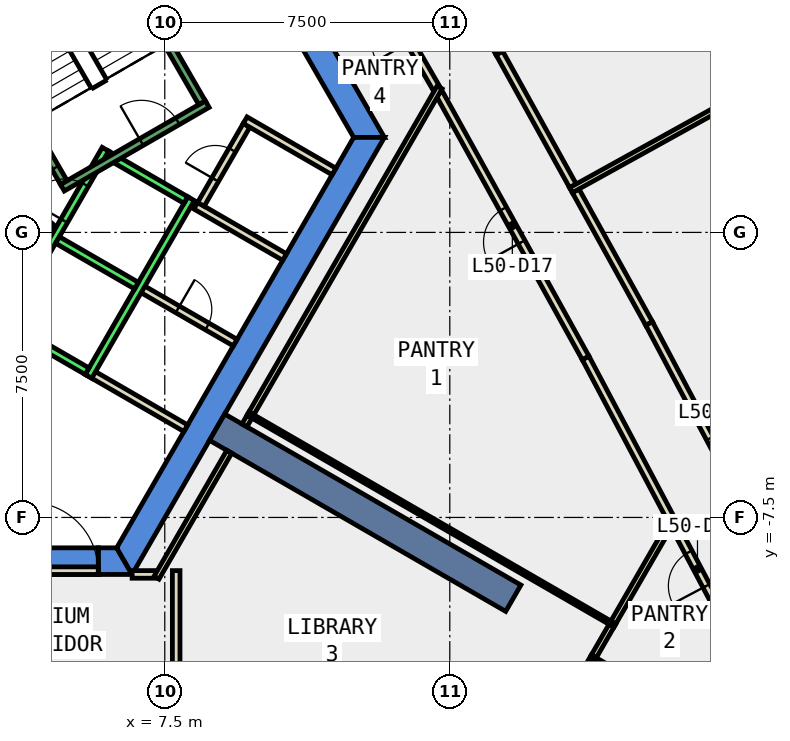
"""IFC4 building model, lengths in metres.
Left out: names, types, materials, properties, quantities, classifications, styles, units other than length and angle.
Written with IfcOpenShell. Run it as: python <this file> out.ifc"""

import sys

from ifc_helpers import new_model, si_unit, direction, frame, frame_2d, origin, place, context, subcontext, project, spatial, polyline, rectangle, outline, extrude, element, fill, save


model = new_model("IFC4")
c1 = context("Model", 3, precision=1e-05, world=origin(), true_north=direction((0.0, 1.0)))
c2 = subcontext(c1, "Body", "Model", "MODEL_VIEW")
j1 = project(units=[si_unit("LENGTHUNIT", "METRE"), si_unit("PLANEANGLEUNIT", "RADIAN")], contexts=[c1])
p1 = place(None, origin())
s1 = spatial("IfcSite", under=j1, at=p1, CompositionType="ELEMENT")
p2 = place(p1, origin())
s2 = spatial("IfcBuilding", under=s1, at=p2, CompositionType="ELEMENT")
p3 = place(p2, frame((0.0, 0.0, 223.4)))
s3 = spatial("IfcBuildingStorey", under=s2, at=p3, CompositionType="ELEMENT", Elevation=223.4)
p4 = place(p3, frame((0.0, 0.0, -0.4)))
e1 = element("IfcWall", 1, at=p4, inside=s3, PredefinedType="SHEAR", context=c2, shape_type="SweptSolid", body=[
    extrude(outline(polyline([(8.084, 11.498), (7.478, 11.148), (12.471, 2.5), (13.279, 2.5), (8.084, 11.498)])), origin(), (0.0, 0.0, 1.0), 4.2),
])
p5 = place(p3, frame((0.0, 0.0, -0.4)))
e2 = element("IfcWall", 2, at=p5, inside=s3, PredefinedType="SHEAR", context=c2, shape_type="SweptSolid", body=[
    extrude(outline(polyline([(5.75, -8.3), (5.75, -9.0), (6.64, -9.0), (6.235, -8.3), (5.75, -8.3)])), origin(), (0.0, 0.0, 1.0), 4.2),
])
p6 = place(p3, frame((0.0, 0.0, 3.6)))
e3 = element("IfcWall", 3, at=p6, inside=s3, PredefinedType="SHEAR", context=c2, shape_type="SweptSolid", body=[
    extrude(outline(polyline([(5.75, -9.0), (5.75, -8.3), (3.75, -8.3), (3.75, -9.0), (5.75, -9.0)])), origin(), (0.0, 0.0, 1.0), 0.2),
])
p7 = place(p3, frame((0.0, 0.0, -0.4)))
e4 = element("IfcWall", 4, at=p7, inside=s3, PredefinedType="SHEAR", context=c2, shape_type="SweptSolid", body=[
    extrude(outline(polyline([(6.64, -9.0), (13.279, 2.5), (12.471, 2.5), (6.235, -8.3), (6.64, -9.0)])), origin(), (0.0, 0.0, 1.0), 4.2),
])
p8 = place(p3, frame((8.877, -5.125, -0.4), z_axis=(0.0, 0.0, 1.0), x_axis=(0.866017533419, -0.500013631625, 0.0)))
e5 = element("IfcWall", 5, at=p8, inside=s3, PredefinedType="SHEAR", context=c2, shape_type="SweptSolid", body=[
    extrude(rectangle(XDim=9.0, YDim=0.8, at=frame_2d((4.5, 0.0))), origin(), (0.0, 0.0, 1.0), 4.2),
])
p9 = place(p3, frame((25.411, 0.968, 0.0), z_axis=(0.0, 0.0, 1.0), x_axis=(-0.484163461668, 0.87497756679, 0.0)))
e6 = element("IfcWall", 6, at=p9, inside=s3, PredefinedType="STANDARD", context=c2, shape_type="SweptSolid", body=[
    extrude(rectangle(XDim=7.247, YDim=0.3, at=frame_2d((3.624, 0.0))), origin(), (0.0, 0.0, 1.0), 3.8),
])
p10 = place(p9, frame((0.612, 0.0, 0.9)))
e7 = element("IfcOpeningElement", 7, at=p10, cuts=e6, PredefinedType="OPENING", context=c2, shape_type="SweptSolid", body=[
    extrude(rectangle(XDim=2.4, YDim=2.6, at=frame_2d((1.2, 1.3))), frame((0.0, 0.16, 0.0), z_axis=(0.0, -1.0, 0.0), x_axis=(1.0, 0.0, 0.0)), (0.0, 0.0, 1.0), 0.32),
])
p11 = place(p9, frame((4.235, 0.0, 0.9)))
e8 = element("IfcOpeningElement", 8, at=p11, cuts=e6, PredefinedType="OPENING", context=c2, shape_type="SweptSolid", body=[
    extrude(rectangle(XDim=2.4, YDim=2.6, at=frame_2d((1.2, 1.3))), frame((0.0, 0.16, 0.0), z_axis=(0.0, -1.0, 0.0), x_axis=(1.0, 0.0, 0.0)), (0.0, 0.0, 1.0), 0.32),
])
p12 = place(p3, frame((14.652, 3.783, 0.0), z_axis=(0.0, 0.0, 1.0), x_axis=(-0.499821427992, 0.866128477837, 0.0)))
e9 = element("IfcWall", 9, at=p12, inside=s3, PredefinedType="PARTITIONING", context=c2, shape_type="SweptSolid", body=[
    extrude(rectangle(XDim=3.844, YDim=0.2, at=frame_2d((1.922, 0.0))), origin(), (0.0, 0.0, 1.0), 3.8),
])
p13 = place(p12, frame((1.421, 0.0, 0.0)))
e10 = element("IfcOpeningElement", 10, at=p13, cuts=e9, PredefinedType="OPENING", context=c2, shape_type="SweptSolid", body=[
    extrude(rectangle(XDim=1.0, YDim=2.1, at=frame_2d((0.5, 1.05))), frame((0.0, 0.11, 0.0), z_axis=(0.0, -1.0, 0.0), x_axis=(1.0, 0.0, 0.0)), (0.0, 0.0, 1.0), 0.22),
])
p14 = place(p3, frame((20.882, -7.659, 0.0), z_axis=(0.0, 0.0, 1.0), x_axis=(-0.468206254133, 0.883619207346, 0.0)))
e11 = element("IfcWall", 11, at=p14, inside=s3, PredefinedType="PARTITIONING", context=c2, shape_type="SweptSolid", body=[
    extrude(rectangle(XDim=4.93, YDim=0.2, at=frame_2d((2.465, 0.0))), origin(), (0.0, 0.0, 1.0), 3.8),
])
p15 = place(p3, frame((18.574, -3.303, 0.0), z_axis=(0.0, 0.0, 1.0), x_axis=(-0.484239190765, 0.874935658279, 0.0)))
e12 = element("IfcWall", 12, at=p15, inside=s3, PredefinedType="PARTITIONING", context=c2, shape_type="SweptSolid", body=[
    extrude(rectangle(XDim=7.963, YDim=0.2, at=frame_2d((3.981, 0.0))), origin(), (0.0, 0.0, 1.0), 3.8),
])
p16 = place(p15, frame((3.482, 0.0, 0.0)))
e13 = element("IfcOpeningElement", 13, at=p16, cuts=e12, PredefinedType="OPENING", context=c2, shape_type="SweptSolid", body=[
    extrude(rectangle(XDim=1.0, YDim=2.1, at=frame_2d((0.5, 1.05))), frame((0.0, 0.11, 0.0), z_axis=(0.0, -1.0, 0.0), x_axis=(1.0, 0.0, 0.0)), (0.0, 0.0, 1.0), 0.22),
])
p17 = place(p3, frame((22.154, -10.06, 0.0), z_axis=(0.0, 0.0, 1.0), x_axis=(-0.468114756541, 0.883667683413, 0.0)))
e14 = element("IfcWall", 14, at=p17, inside=s3, PredefinedType="PARTITIONING", context=c2, shape_type="SweptSolid", body=[
    extrude(rectangle(XDim=2.717, YDim=0.2, at=frame_2d((1.359, 0.0))), origin(), (0.0, 0.0, 1.0), 3.8),
])
p18 = place(p17, frame((0.859, 0.0, 0.0)))
e15 = element("IfcOpeningElement", 15, at=p18, cuts=e14, PredefinedType="OPENING", context=c2, shape_type="SweptSolid", body=[
    extrude(rectangle(XDim=1.0, YDim=2.1, at=frame_2d((0.5, 1.05))), frame((0.0, 0.11, 0.0), z_axis=(0.0, -1.0, 0.0), x_axis=(1.0, 0.0, 0.0)), (0.0, 0.0, 1.0), 0.22),
])
p19 = place(p3, frame((18.312, 1.094, 0.0), z_axis=(0.0, 0.0, 1.0), x_axis=(0.484328424129, -0.874886265511, 0.0)))
e16 = element("IfcWall", 16, at=p19, inside=s3, PredefinedType="PARTITIONING", context=c2, shape_type="SweptSolid", body=[
    extrude(rectangle(XDim=3.991, YDim=0.2, at=frame_2d((1.996, 0.0))), origin(), (0.0, 0.0, 1.0), 3.8),
])
p20 = place(p3, frame((20.245, -2.398, 0.0), z_axis=(0.0, 0.0, 1.0), x_axis=(0.468063775621, -0.883694688199, 0.0)))
e17 = element("IfcWall", 17, at=p20, inside=s3, PredefinedType="PARTITIONING", context=c2, shape_type="SweptSolid", body=[
    extrude(rectangle(XDim=7.836, YDim=0.2, at=frame_2d((3.918, 0.0))), origin(), (0.0, 0.0, 1.0), 3.8),
])
p21 = place(p20, frame((3.418, 0.0, 0.0)))
e18 = element("IfcOpeningElement", 18, at=p21, cuts=e17, PredefinedType="OPENING", context=c2, shape_type="SweptSolid", body=[
    extrude(rectangle(XDim=1.0, YDim=2.1, at=frame_2d((0.5, 1.05))), frame((0.0, 0.11, 0.0), z_axis=(0.0, -1.0, 0.0), x_axis=(1.0, 0.0, 0.0)), (0.0, 0.0, 1.0), 0.22),
])
p22 = place(p3, frame((12.202, 11.828, 0.0), z_axis=(0.0, 0.0, 1.0), x_axis=(0.499919823193, -0.866071688937, 0.0)))
e19 = element("IfcWall", 19, at=p22, inside=s3, PredefinedType="PARTITIONING", context=c2, shape_type="SweptSolid", body=[
    extrude(rectangle(XDim=8.209, YDim=0.2, at=frame_2d((4.104, 0.0))), origin(), (0.0, 0.0, 1.0), 3.8),
])
p23 = place(p22, frame((3.604, 0.0, 0.0)))
e20 = element("IfcOpeningElement", 20, at=p23, cuts=e19, PredefinedType="OPENING", context=c2, shape_type="SweptSolid", body=[
    extrude(rectangle(XDim=1.0, YDim=2.1, at=frame_2d((0.5, 1.05))), frame((0.0, 0.11, 0.0), z_axis=(0.0, -1.0, 0.0), x_axis=(1.0, 0.0, 0.0)), (0.0, 0.0, 1.0), 0.22),
])
p24 = place(p3, frame((16.306, 4.718, 0.0), z_axis=(0.0, 0.0, 1.0), x_axis=(0.484411997038, -0.874839995156, 0.0)))
e21 = element("IfcWall", 21, at=p24, inside=s3, PredefinedType="PARTITIONING", context=c2, shape_type="SweptSolid", body=[
    extrude(rectangle(XDim=3.993, YDim=0.2, at=frame_2d((1.996, 0.0))), origin(), (0.0, 0.0, 1.0), 3.8),
])
p25 = place(p3, frame((8.053, -5.152, 0.0), z_axis=(0.0, 0.0, 1.0), x_axis=(-0.865808344015, 0.500375770231, 0.0)))
e22 = element("IfcWall", 22, at=p25, inside=s3, PredefinedType="PARTITIONING", context=c2, shape_type="SweptSolid", body=[
    extrude(rectangle(XDim=2.9, YDim=0.2, at=frame_2d((1.45, 0.0))), origin(), (0.0, 0.0, 1.0), 3.8),
])
p26 = place(p3, frame((6.841, -1.451, 0.0), z_axis=(0.0, 0.0, 1.0), x_axis=(0.866220623736, -0.499661716578, 0.0)))
e23 = element("IfcWall", 23, at=p26, inside=s3, PredefinedType="PARTITIONING", context=c2, shape_type="SweptSolid", body=[
    extrude(rectangle(XDim=2.9, YDim=0.2, at=frame_2d((1.45, 0.0))), origin(), (0.0, 0.0, 1.0), 3.8),
])
p27 = place(p26, frame((1.15, 0.0, 0.0)))
e24 = element("IfcOpeningElement", 24, at=p27, cuts=e23, PredefinedType="OPENING", context=c2, shape_type="SweptSolid", body=[
    extrude(rectangle(XDim=0.9, YDim=2.1, at=frame_2d((0.45, 1.05))), frame((0.0, 0.11, 0.0), z_axis=(0.0, -1.0, 0.0), x_axis=(1.0, 0.0, 0.0)), (0.0, 0.0, 1.0), 0.22),
])
p28 = place(p3, frame((10.653, -0.648, 0.0), z_axis=(0.0, 0.0, 1.0), x_axis=(-0.866036505625, 0.499980770555, 0.0)))
e25 = element("IfcWall", 25, at=p28, inside=s3, PredefinedType="PARTITIONING", context=c2, shape_type="SweptSolid", body=[
    extrude(rectangle(XDim=2.7, YDim=0.2, at=frame_2d((1.35, 0.0))), origin(), (0.0, 0.0, 1.0), 3.8),
])
p29 = place(p3, frame((8.451, 0.738, 0.0), z_axis=(0.0, 0.0, 1.0), x_axis=(0.499913221443, 0.866075499611, 0.0)))
e26 = element("IfcWall", 26, at=p29, inside=s3, PredefinedType="PARTITIONING", context=c2, shape_type="SweptSolid", body=[
    extrude(rectangle(XDim=2.4, YDim=0.2, at=frame_2d((1.2, 0.0))), origin(), (0.0, 0.0, 1.0), 3.8),
])
p30 = place(p29, frame((0.75, 0.0, 0.0)))
e27 = element("IfcOpeningElement", 27, at=p30, cuts=e26, PredefinedType="OPENING", context=c2, shape_type="SweptSolid", body=[
    extrude(rectangle(XDim=0.9, YDim=2.1, at=frame_2d((0.45, 1.05))), frame((0.0, 0.11, 0.0), z_axis=(0.0, -1.0, 0.0), x_axis=(1.0, 0.0, 0.0)), (0.0, 0.0, 1.0), 0.22),
])
p31 = place(p3, frame((9.615, 2.953, 0.0), z_axis=(0.0, 0.0, 1.0), x_axis=(0.866013897511, -0.50001992892, 0.0)))
e28 = element("IfcWall", 28, at=p31, inside=s3, PredefinedType="PARTITIONING", context=c2, shape_type="SweptSolid", body=[
    extrude(rectangle(XDim=2.7, YDim=0.2, at=frame_2d((1.35, 0.0))), origin(), (0.0, 0.0, 1.0), 3.8),
])
p32 = place(p3, frame((6.641, -8.999, 0.0), z_axis=(0.0, 0.0, 1.0), x_axis=(1.0, 0.0, 0.0)))
e29 = element("IfcWall", 29, at=p32, inside=s3, PredefinedType="PARTITIONING", context=c2, shape_type="SweptSolid", body=[
    extrude(rectangle(XDim=0.617, YDim=0.2, at=frame_2d((0.309, 0.0))), origin(), (0.0, 0.0, 1.0), 3.8),
])
p33 = place(p3, frame((7.283, -9.086, 0.0), z_axis=(0.0, 0.0, 1.0), x_axis=(0.500035303972, 0.866005020067, 0.0)))
e30 = element("IfcWall", 30, at=p33, inside=s3, PredefinedType="PARTITIONING", context=c2, shape_type="SweptSolid", body=[
    extrude(rectangle(XDim=3.828, YDim=0.15, at=frame_2d((1.914, 0.0))), origin(), (0.0, 0.0, 1.0), 3.8),
])
p34 = place(p3, frame((9.779, -4.762, 0.0), z_axis=(0.0, 0.0, 1.0), x_axis=(0.499990552429, 0.866030858274, 0.0)))
e31 = element("IfcWall", 31, at=p34, inside=s3, PredefinedType="PARTITIONING", context=c2, shape_type="SweptSolid", body=[
    extrude(rectangle(XDim=9.906, YDim=0.15, at=frame_2d((4.953, 0.0))), origin(), (0.0, 0.0, 1.0), 3.8),
])
p35 = place(p3, frame((4.301, 0.315, 0.0), z_axis=(0.0, 0.0, 1.0), x_axis=(0.741798017506, -0.670623367639, 0.0)))
e32 = element("IfcWall", 32, at=p35, inside=s3, PredefinedType="PARTITIONING", context=c2, shape_type="SweptSolid", body=[
    extrude(rectangle(XDim=0.309, YDim=0.2, at=frame_2d((0.154, 0.0))), origin(), (0.0, 0.0, 1.0), 3.8),
])
p36 = place(p3, frame((7.8, -8.899, 0.0), z_axis=(0.0, 0.0, 1.0), x_axis=(0.0, -1.0, 0.0)))
e33 = element("IfcWall", 33, at=p36, inside=s3, PredefinedType="PARTITIONING", context=c2, shape_type="SweptSolid", body=[
    extrude(rectangle(XDim=6.06, YDim=0.2, at=frame_2d((3.03, 0.0))), origin(), (0.0, 0.0, 1.0), 3.8),
])
p37 = place(p3, frame((9.689, -4.768, 0.0), z_axis=(0.0, 0.0, 1.0), x_axis=(0.866023322577, -0.500003604739, 0.0)))
e34 = element("IfcWall", 34, at=p37, inside=s3, PredefinedType="PARTITIONING", context=c2, shape_type="SweptSolid", body=[
    extrude(rectangle(XDim=11.15, YDim=0.1, at=frame_2d((5.575, 0.0))), origin(), (0.0, 0.0, 1.0), 3.8),
])
p38 = place(p3, frame((18.789, -11.156, 0.0), z_axis=(0.0, 0.0, 1.0), x_axis=(-0.499822078765, -0.866128102292, 0.0)))
e35 = element("IfcWall", 35, at=p38, inside=s3, PredefinedType="PARTITIONING", context=c2, shape_type="SweptSolid", body=[
    extrude(rectangle(XDim=4.313, YDim=0.15, at=frame_2d((2.157, 0.0))), origin(), (0.0, 0.0, 1.0), 3.8),
])
p39 = place(p3, frame((19.255, -10.349, 0.0), z_axis=(0.0, 0.0, 1.0), x_axis=(-0.499185199876, -0.866495318063, 0.0)))
e36 = element("IfcWall", 36, at=p39, inside=s3, PredefinedType="PARTITIONING", context=c2, shape_type="SweptSolid", body=[
    extrude(rectangle(XDim=0.931, YDim=0.15, at=frame_2d((0.466, 0.0))), origin(), (0.0, 0.0, 1.0), 3.8),
])
p40 = place(p3, frame((20.847, -7.593, 0.0), z_axis=(0.0, 0.0, 1.0), x_axis=(-0.500261762561, -0.865874222343, 0.0)))
e37 = element("IfcWall", 37, at=p40, inside=s3, PredefinedType="PARTITIONING", context=c2, shape_type="SweptSolid", body=[
    extrude(rectangle(XDim=3.082, YDim=0.15, at=frame_2d((1.541, 0.0))), origin(), (0.0, 0.0, 1.0), 3.8),
])
p41 = place(p3, frame((18.765, -11.199, 0.0), z_axis=(0.0, 0.0, 1.0), x_axis=(0.866038964406, -0.499976511579, 0.0)))
e38 = element("IfcWall", 38, at=p41, inside=s3, PredefinedType="PARTITIONING", context=c2, shape_type="SweptSolid", body=[
    extrude(rectangle(XDim=4.242, YDim=0.1, at=frame_2d((2.121, 0.0))), origin(), (0.0, 0.0, 1.0), 3.8),
])
p42 = place(p3, frame((18.189, 1.111, 0.0), z_axis=(0.0, 0.0, 1.0), x_axis=(0.874928335558, 0.484252421405, 0.0)))
e39 = element("IfcWall", 39, at=p42, inside=s3, PredefinedType="PARTITIONING", context=c2, shape_type="SweptSolid", body=[
    extrude(rectangle(XDim=6.1, YDim=0.15, at=frame_2d((3.05, 0.0))), origin(), (0.0, 0.0, 1.0), 3.8),
])
p43 = place(p3, frame((3.75, -8.9, 0.0), z_axis=(0.0, 0.0, 1.0), x_axis=(1.0, 0.0, 0.0)))
e40 = element("IfcWall", 40, at=p43, inside=s3, PredefinedType="PARTITIONING", context=c2, shape_type="SweptSolid", body=[
    extrude(rectangle(XDim=2.0, YDim=0.2, at=frame_2d((1.0, 0.0))), origin(), (0.0, 0.0, 1.0), 2.4),
])
p44 = place(p43, frame((0.19, 0.0, 0.0)))
e41 = element("IfcOpeningElement", 41, at=p44, cuts=e40, PredefinedType="OPENING", context=c2, shape_type="SweptSolid", body=[
    extrude(rectangle(XDim=1.8, YDim=2.1, at=frame_2d((0.9, 1.05))), frame((0.0, 0.11, 0.0), z_axis=(0.0, -1.0, 0.0), x_axis=(1.0, 0.0, 0.0)), (0.0, 0.0, 1.0), 0.22),
])
p45 = place(p3, frame((9.596, -5.079, 0.0), z_axis=(0.0, 0.0, 1.0), x_axis=(0.500782702656, 0.865573038351, 0.0)))
e42 = element("IfcWall", 42, at=p45, inside=s3, PredefinedType="PARTITIONING", context=c2, shape_type="SweptSolid", body=[
    extrude(rectangle(XDim=0.266, YDim=0.15, at=frame_2d((0.133, 0.0))), origin(), (0.0, 0.0, 1.0), 3.8),
])
p46 = place(p3, frame((3.24, -2.488, 0.0), z_axis=(0.0, 0.0, 1.0), x_axis=(0.500034260056, 0.866005622828, 0.0)))
e43 = element("IfcWall", 43, at=p46, inside=s3, PredefinedType="STANDARD", context=c2, shape_type="SweptSolid", body=[
    extrude(rectangle(XDim=5.399, YDim=0.2, at=frame_2d((2.7, 0.0))), origin(), (0.0, 0.0, 1.0), 3.8),
])
p47 = place(p46, frame((3.225, 0.0, 0.0)))
e44 = element("IfcOpeningElement", 44, at=p47, cuts=e43, PredefinedType="OPENING", context=c2, shape_type="SweptSolid", body=[
    extrude(rectangle(XDim=1.1, YDim=2.1, at=frame_2d((0.55, 1.05))), frame((0.0, 0.11, 0.0), z_axis=(0.0, -1.0, 0.0), x_axis=(1.0, 0.0, 0.0)), (0.0, 0.0, 1.0), 0.22),
])
p48 = place(p46, frame((1.225, 0.0, 0.0)))
e45 = element("IfcOpeningElement", 45, at=p48, cuts=e43, PredefinedType="OPENING", context=c2, shape_type="SweptSolid", body=[
    extrude(rectangle(XDim=1.1, YDim=2.1, at=frame_2d((0.55, 1.05))), frame((0.0, 0.11, 0.0), z_axis=(0.0, -1.0, 0.0), x_axis=(1.0, 0.0, 0.0)), (0.0, 0.0, 1.0), 0.22),
])
p49 = place(p3, frame((5.492, -3.788, 0.0), z_axis=(0.0, 0.0, 1.0), x_axis=(0.500034260056, 0.866005622828, 0.0)))
e46 = element("IfcWall", 46, at=p49, inside=s3, PredefinedType="STANDARD", context=c2, shape_type="SweptSolid", body=[
    extrude(rectangle(XDim=5.399, YDim=0.2, at=frame_2d((2.7, 0.0))), origin(), (0.0, 0.0, 1.0), 3.8),
])
p50 = place(p3, frame((3.377, -2.452, 0.0), z_axis=(0.0, 0.0, 1.0), x_axis=(0.865955154139, -0.50012165622, 0.0)))
e47 = element("IfcWall", 47, at=p50, inside=s3, PredefinedType="STANDARD", context=c2, shape_type="SweptSolid", body=[
    extrude(rectangle(XDim=2.4, YDim=0.2, at=frame_2d((1.2, 0.0))), origin(), (0.0, 0.0, 1.0), 3.8),
])
for number, where, z_axis, x_axis in (
    (48, (4.677, -0.2, 0.0), (0.0, 0.0, 1.0), (0.866, -0.5, 0.0)),
    (49, (5.977, 2.052, 0.0), (0.0, 0.0, 1.0), (0.866, -0.5, 0.0)),
):
    element("IfcWall", number, at=place(p3, frame(where, z_axis=z_axis, x_axis=x_axis)), inside=s3, PredefinedType="STANDARD", context=c2, shape_type="SweptSolid", body=[
        extrude(rectangle(XDim=2.399, YDim=0.2, at=frame_2d((1.2, 0.0))), origin(), (0.0, 0.0, 1.0), 3.8),
    ])
p51 = place(p3, frame((4.806, 1.176, 0.0), z_axis=(0.0, 0.0, 1.0), x_axis=(0.866059941101, 0.499940174841, 0.0)))
e50 = element("IfcWall", 50, at=p51, inside=s3, PredefinedType="STANDARD", context=c2, shape_type="SweptSolid", body=[
    extrude(rectangle(XDim=4.4, YDim=0.2, at=frame_2d((2.2, 0.0))), origin(), (0.0, 0.0, 1.0), 3.8),
])
p52 = place(p51, frame((2.4, 0.0, 0.0)))
e51 = element("IfcOpeningElement", 51, at=p52, cuts=e50, PredefinedType="OPENING", context=c2, shape_type="SweptSolid", body=[
    extrude(rectangle(XDim=1.1, YDim=2.2, at=frame_2d((0.55, 1.1))), frame((0.0, 0.11, 0.0), z_axis=(0.0, -1.0, 0.0), x_axis=(1.0, 0.0, 0.0)), (0.0, 0.0, 1.0), 0.22),
])
p53 = place(p3, frame((4.843, 1.312, 0.0), z_axis=(0.0, 0.0, 1.0), x_axis=(-0.499963383562, 0.866046543262, 0.0)))
e52 = element("IfcWall", 52, at=p53, inside=s3, PredefinedType="STANDARD", context=c2, shape_type="SweptSolid", body=[
    extrude(rectangle(XDim=6.9, YDim=0.2, at=frame_2d((3.45, 0.0))), origin(), (0.0, 0.0, 1.0), 3.8),
])
p54 = place(p53, frame((0.45, 0.0, 0.0)))
e53 = element("IfcOpeningElement", 53, at=p54, cuts=e52, PredefinedType="OPENING", context=c2, shape_type="SweptSolid", body=[
    extrude(rectangle(XDim=1.1, YDim=2.2, at=frame_2d((0.55, 1.1))), frame((0.0, 0.11, 0.0), z_axis=(0.0, -1.0, 0.0), x_axis=(1.0, 0.0, 0.0)), (0.0, 0.0, 1.0), 0.22),
])
p55 = place(p3, frame((8.48, 3.412, 0.0), z_axis=(0.0, 0.0, 1.0), x_axis=(-0.499978703459, 0.866037698999, 0.0)))
e54 = element("IfcWall", 54, at=p55, inside=s3, PredefinedType="STANDARD", context=c2, shape_type="SweptSolid", body=[
    extrude(rectangle(XDim=6.9, YDim=0.2, at=frame_2d((3.45, 0.0))), origin(), (0.0, 0.0, 1.0), 3.8),
])
p56 = place(p21, origin())
e55 = element("IfcDoor", 55, at=p56, inside=s3, OperationType="SINGLE_SWING_LEFT", PredefinedType="DOOR", context=c2, shape_type="SweptSolid", body=[
    extrude(rectangle(XDim=1.0, YDim=2.1, at=frame_2d((0.5, 1.05))), frame((0.0, 0.025, 0.0), z_axis=(0.0, -1.0, 0.0), x_axis=(1.0, 0.0, 0.0)), (0.0, 0.0, 1.0), 0.05),
])
fill(e18, e55)
p57 = place(p16, origin())
e56 = element("IfcDoor", 56, at=p57, inside=s3, OperationType="SINGLE_SWING_LEFT", PredefinedType="DOOR", context=c2, shape_type="SweptSolid", body=[
    extrude(rectangle(XDim=1.0, YDim=2.1, at=frame_2d((0.5, 1.05))), frame((0.0, 0.025, 0.0), z_axis=(0.0, -1.0, 0.0), x_axis=(1.0, 0.0, 0.0)), (0.0, 0.0, 1.0), 0.05),
])
fill(e13, e56)
p58 = place(p18, origin())
e57 = element("IfcDoor", 57, at=p58, inside=s3, OperationType="SINGLE_SWING_LEFT", PredefinedType="DOOR", context=c2, shape_type="SweptSolid", body=[
    extrude(rectangle(XDim=1.0, YDim=2.1, at=frame_2d((0.5, 1.05))), frame((0.0, 0.025, 0.0), z_axis=(0.0, -1.0, 0.0), x_axis=(1.0, 0.0, 0.0)), (0.0, 0.0, 1.0), 0.05),
])
fill(e15, e57)
p59 = place(p27, origin())
e58 = element("IfcDoor", 58, at=p59, inside=s3, OperationType="SINGLE_SWING_LEFT", PredefinedType="DOOR", context=c2, shape_type="SweptSolid", body=[
    extrude(rectangle(XDim=0.9, YDim=2.1, at=frame_2d((0.45, 1.05))), frame((0.0, 0.025, 0.0), z_axis=(0.0, -1.0, 0.0), x_axis=(1.0, 0.0, 0.0)), (0.0, 0.0, 1.0), 0.05),
])
fill(e24, e58)
p60 = place(p30, origin())
e59 = element("IfcDoor", 59, at=p60, inside=s3, OperationType="SINGLE_SWING_LEFT", PredefinedType="DOOR", context=c2, shape_type="SweptSolid", body=[
    extrude(rectangle(XDim=0.9, YDim=2.1, at=frame_2d((0.45, 1.05))), frame((0.0, 0.025, 0.0), z_axis=(0.0, -1.0, 0.0), x_axis=(1.0, 0.0, 0.0)), (0.0, 0.0, 1.0), 0.05),
])
fill(e27, e59)
p61 = place(p44, origin())
e60 = element("IfcDoor", 60, at=p61, inside=s3, OperationType="DOUBLE_DOOR_SINGLE_SWING", PredefinedType="DOOR", context=c2, shape_type="SweptSolid", body=[
    extrude(rectangle(XDim=1.8, YDim=2.1, at=frame_2d((0.9, 1.05))), frame((0.0, 0.025, 0.0), z_axis=(0.0, -1.0, 0.0), x_axis=(1.0, 0.0, 0.0)), (0.0, 0.0, 1.0), 0.05),
])
fill(e41, e60)
p62 = place(p47, origin())
e61 = element("IfcDoor", 61, at=p62, inside=s3, OperationType="SLIDING_TO_LEFT", PredefinedType="DOOR", context=c2, shape_type="SweptSolid", body=[
    extrude(rectangle(XDim=1.1, YDim=2.1, at=frame_2d((0.55, 1.05))), frame((0.0, 0.025, 0.0), z_axis=(0.0, -1.0, 0.0), x_axis=(1.0, 0.0, 0.0)), (0.0, 0.0, 1.0), 0.05),
])
fill(e44, e61)
p63 = place(p54, origin())
e62 = element("IfcDoor", 62, at=p63, inside=s3, OperationType="SINGLE_SWING_LEFT", PredefinedType="DOOR", context=c2, shape_type="SweptSolid", body=[
    extrude(rectangle(XDim=1.1, YDim=2.2, at=frame_2d((0.55, 1.1))), frame((0.0, 0.025, 0.0), z_axis=(0.0, -1.0, 0.0), x_axis=(1.0, 0.0, 0.0)), (0.0, 0.0, 1.0), 0.05),
])
fill(e53, e62)
p64 = place(p52, origin())
e63 = element("IfcDoor", 63, at=p64, inside=s3, OperationType="SINGLE_SWING_LEFT", PredefinedType="DOOR", context=c2, shape_type="SweptSolid", body=[
    extrude(rectangle(XDim=1.1, YDim=2.2, at=frame_2d((0.55, 1.1))), frame((0.0, 0.025, 0.0), z_axis=(0.0, -1.0, 0.0), x_axis=(1.0, 0.0, 0.0)), (0.0, 0.0, 1.0), 0.05),
])
fill(e51, e63)
save(model, sys.argv[1])
